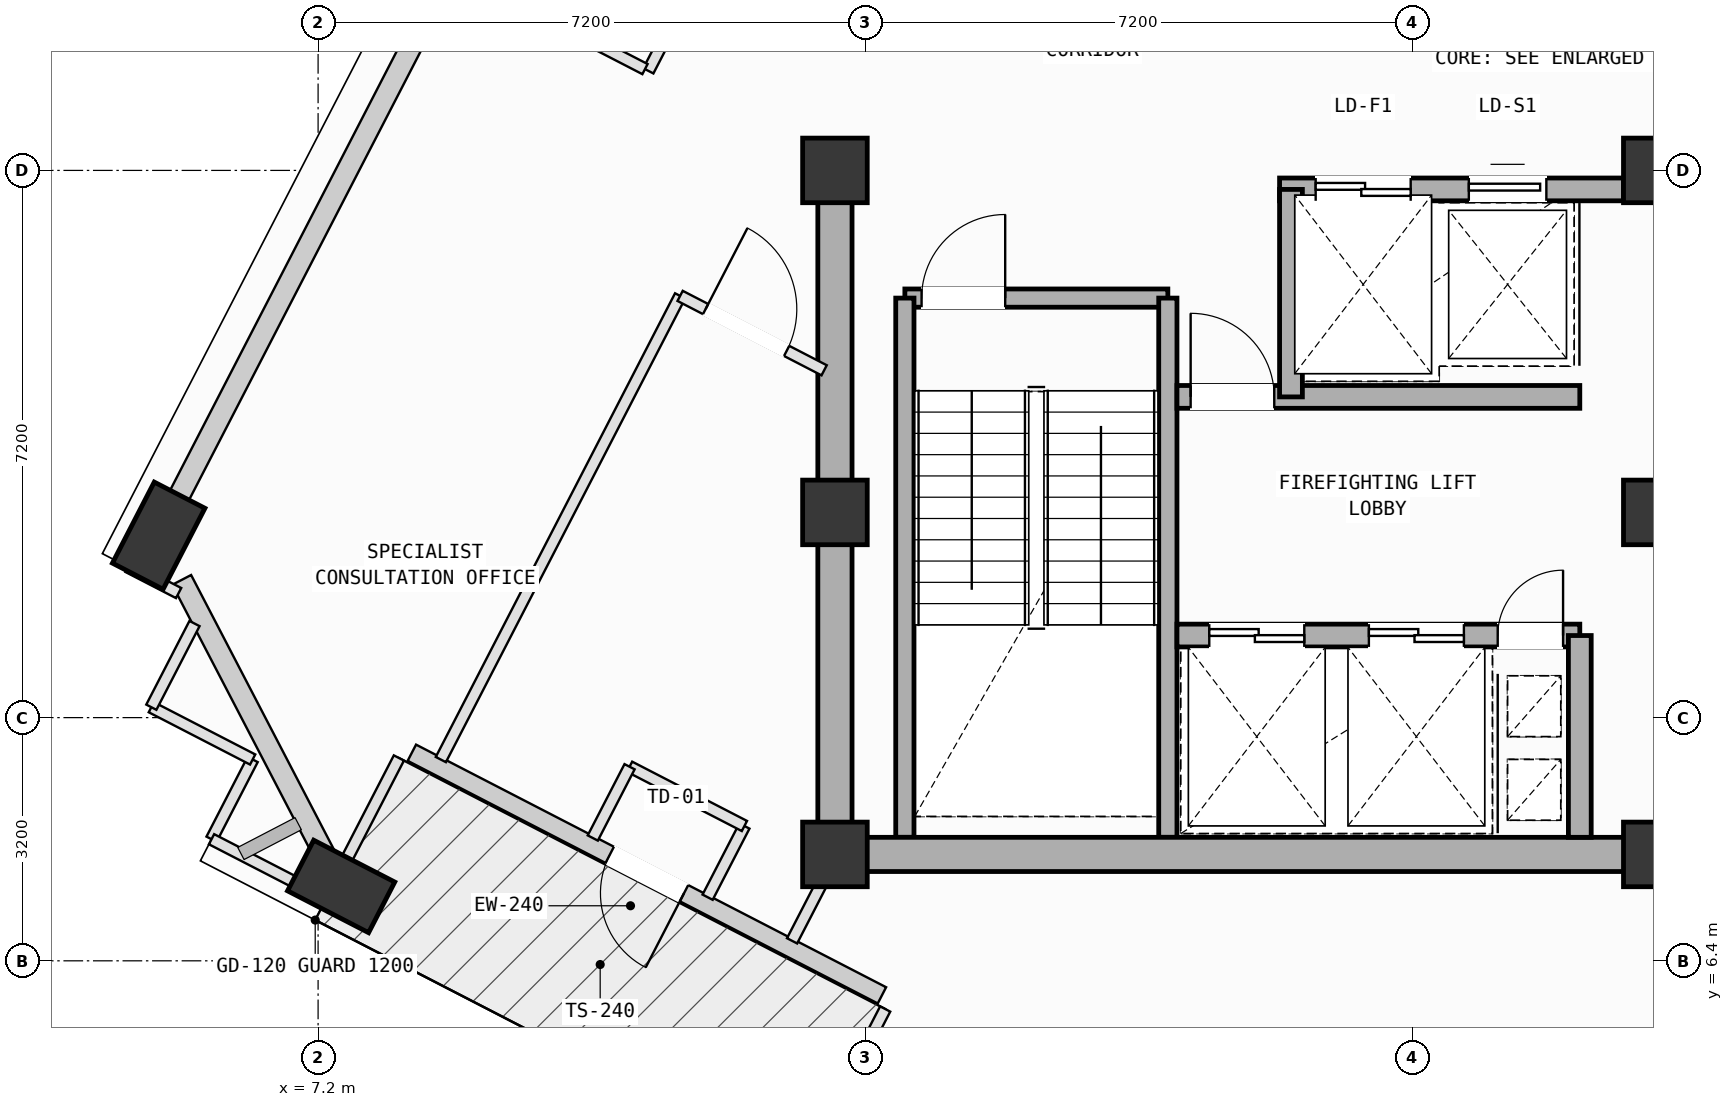
"""IFC4 building model, lengths in metres.
Left out: names, types, materials, properties, quantities, classifications, styles, units other than length and angle.
Written with IfcOpenShell. Run it as: python <this file> out.ifc"""

import sys

from ifc_helpers import new_model, si_unit, direction, frame, frame_2d, origin, origin_2d, place, context, subcontext, project, spatial, rectangle, extrude, element, fill, save


model = new_model("IFC4")
c1 = context("Model", 3, precision=1e-05, world=origin(), true_north=direction((0.0, 1.0)))
c2 = subcontext(c1, "Body", "Model", "MODEL_VIEW")
j1 = project(units=[si_unit("LENGTHUNIT", "METRE"), si_unit("PLANEANGLEUNIT", "RADIAN")], contexts=[c1])
p1 = place(None, origin())
s1 = spatial("IfcSite", under=j1, at=p1, CompositionType="ELEMENT")
p2 = place(p1, origin())
s2 = spatial("IfcBuilding", under=s1, at=p2, CompositionType="ELEMENT")
p3 = place(p2, frame((0.0, 0.0, 292.6)))
s3 = spatial("IfcBuildingStorey", under=s2, at=p3, CompositionType="ELEMENT", Elevation=292.6)
for number, where, z_axis, x_axis in (
    (1, (14.0, 7.8, 0.0), (0.0, 0.0, 1.0), (1.0, 0.0, 0.0)),
    (2, (14.0, 12.3, 0.0), (0.0, 0.0, 1.0), (1.0, 0.0, 0.0)),
    (3, (14.0, 16.8, 0.0), (0.0, 0.0, 1.0), (1.0, 0.0, 0.0)),
    (4, (24.8, 7.8, 0.0), (0.0, 0.0, 1.0), (1.0, 0.0, 0.0)),
    (5, (24.8, 12.3, 0.0), (0.0, 0.0, 1.0), (1.0, 0.0, 0.0)),
    (6, (24.8, 16.8, 0.0), (0.0, 0.0, 1.0), (1.0, 0.0, 0.0)),
):
    element("IfcColumn", number, at=place(p3, frame(where, z_axis=z_axis, x_axis=x_axis)), inside=s3, PredefinedType="COLUMN", context=c2, shape_type="SweptSolid", body=[
        extrude(rectangle(XDim=0.85, YDim=0.85, at=origin_2d()), origin(), (0.0, 0.0, 1.0), 4.0),
    ])
p4 = place(p3, frame((8.863, 19.281, 0.002), z_axis=(0.023634379865, -0.101767573967, 0.994527413889), x_axis=(0.246838352146, 0.964599256067, 0.092839124866)))
e7 = element("IfcColumn", 7, at=p4, inside=s3, PredefinedType="COLUMN", context=c2, shape_type="SweptSolid", body=[
    extrude(rectangle(XDim=1.2, YDim=0.75, at=origin_2d()), origin(), (0.0, 0.0, 1.0), 4.018),
])
p5 = place(p3, frame((5.103, 11.994, 0.002), z_axis=(0.053617586983, -0.116746994481, 0.991713312226), x_axis=(0.049001612561, 0.992253020135, 0.114161228095)))
e8 = element("IfcColumn", 8, at=p5, inside=s3, PredefinedType="COLUMN", context=c2, shape_type="SweptSolid", body=[
    extrude(rectangle(XDim=1.2, YDim=0.75, at=origin_2d()), origin(), (0.0, 0.0, 1.0), 4.03),
])
p6 = place(p3, frame((7.503, 7.379, 0.002), z_axis=(0.072515084343, -0.106682592755, 0.991645292908), x_axis=(-0.990592693613, -0.123392933804, 0.059163326888)))
e9 = element("IfcColumn", 9, at=p6, inside=s3, PredefinedType="COLUMN", context=c2, shape_type="SweptSolid", body=[
    extrude(rectangle(XDim=1.2, YDim=0.75, at=origin_2d()), origin(), (0.0, 0.0, 1.0), 4.03),
])
p7 = place(p3, frame((14.618, 5.946, 0.0), z_axis=(0.0, 0.0, 1.0), x_axis=(-0.888607744186, 0.45866793759, 0.0)))
e10 = element("IfcWall", 10, at=p7, inside=s3, PredefinedType="SOLIDWALL", context=c2, shape_type="SweptSolid", body=[
    extrude(rectangle(XDim=6.96, YDim=0.24, at=frame_2d((3.48, 0.0))), origin(), (0.0, 0.0, 1.0), 3.265),
])
p8 = place(p7, frame((2.93, 0.0, 0.0)))
e11 = element("IfcOpeningElement", 11, at=p8, cuts=e10, PredefinedType="OPENING", context=c2, shape_type="SweptSolid", body=[
    extrude(rectangle(XDim=1.1, YDim=2.15, at=frame_2d((0.55, 1.075))), frame((0.0, 0.13, 0.0), z_axis=(0.0, -1.0, 0.0), x_axis=(1.0, 0.0, 0.0)), (0.0, 0.0, 1.0), 0.26),
])
p9 = place(p3, frame((5.186, 12.156, 0.0), z_axis=(0.0, 0.0, 1.0), x_axis=(0.458658706645, 0.888612508813, 0.0)))
e12 = element("IfcWall", 12, at=p9, inside=s3, PredefinedType="SOLIDWALL", context=c2, shape_type="SweptSolid", body=[
    extrude(rectangle(XDim=7.485, YDim=0.28, at=frame_2d((3.742, 0.0))), origin(), (0.0, 0.0, 1.0), 3.265),
])
p10 = place(p3, frame((7.345, 7.683, 0.0), z_axis=(0.0, 0.0, 1.0), x_axis=(-0.461467947399, 0.887156882137, 0.0)))
e13 = element("IfcWall", 13, at=p10, inside=s3, PredefinedType="SOLIDWALL", context=c2, shape_type="SweptSolid", body=[
    extrude(rectangle(XDim=4.203, YDim=0.28, at=frame_2d((2.102, 0.0))), origin(), (0.0, 0.0, 1.0), 3.265),
])
p11 = place(p3, frame((14.92, 15.12, 0.0), z_axis=(0.0, 0.0, 1.0), x_axis=(1.0, 0.0, 0.0)))
e14 = element("IfcWall", 14, at=p11, inside=s3, PredefinedType="SOLIDWALL", context=c2, shape_type="SweptSolid", body=[
    extrude(rectangle(XDim=3.46, YDim=0.24, at=frame_2d((1.73, 0.0))), origin(), (0.0, 0.0, 1.0), 3.78),
])
p12 = place(p11, frame((0.22, 0.0, 0.0)))
e15 = element("IfcOpeningElement", 15, at=p12, cuts=e14, PredefinedType="OPENING", context=c2, shape_type="SweptSolid", body=[
    extrude(rectangle(XDim=1.1, YDim=2.15, at=frame_2d((0.55, 1.075))), frame((0.0, 0.13, 0.0), z_axis=(0.0, -1.0, 0.0), x_axis=(1.0, 0.0, 0.0)), (0.0, 0.0, 1.0), 0.26),
])
for number, where, z_axis, x_axis in (
    (16, (18.38, 15.12, 0.0), (0.0, 0.0, 1.0), (0.0, -1.0, 0.0)),
    (17, (14.92, 8.025, 0.0), (0.0, 0.0, 1.0), (0.0, 1.0, 0.0)),
):
    element("IfcWall", number, at=place(p3, frame(where, z_axis=z_axis, x_axis=x_axis)), inside=s3, PredefinedType="SOLIDWALL", context=c2, shape_type="SweptSolid", body=[
        extrude(rectangle(XDim=7.095, YDim=0.24, at=frame_2d((3.548, 0.0))), origin(), (0.0, 0.0, 1.0), 3.78),
    ])
p13 = place(p3, frame((14.0, 7.8, 0.0), z_axis=(0.0, 0.0, 1.0), x_axis=(1.0, 0.0, 0.0)))
e18 = element("IfcWall", 18, at=p13, inside=s3, PredefinedType="SHEAR", context=c2, shape_type="SweptSolid", body=[
    extrude(rectangle(XDim=10.8, YDim=0.45, at=frame_2d((5.4, 0.0))), origin(), (0.0, 0.0, 1.0), 3.78),
])
p14 = place(p3, frame((14.0, 16.8, 0.0), z_axis=(0.0, 0.0, 1.0), x_axis=(0.0, -1.0, 0.0)))
e19 = element("IfcWall", 19, at=p14, inside=s3, PredefinedType="SHEAR", context=c2, shape_type="SweptSolid", body=[
    extrude(rectangle(XDim=9.0, YDim=0.45, at=frame_2d((4.5, 0.0))), origin(), (0.0, 0.0, 1.0), 3.78),
])
p15 = place(p3, frame((19.85, 16.55, 0.0), z_axis=(0.0, 0.0, 1.0), x_axis=(1.0, 0.0, 0.0)))
e20 = element("IfcWall", 20, at=p15, inside=s3, PredefinedType="SOLIDWALL", context=c2, shape_type="SweptSolid", body=[
    extrude(rectangle(XDim=4.525, YDim=0.3, at=frame_2d((2.262, 0.0))), origin(), (0.0, 0.0, 1.0), 3.78),
])
p16 = place(p15, frame((0.475, 0.0, 0.0)))
e21 = element("IfcOpeningElement", 21, at=p16, cuts=e20, PredefinedType="OPENING", context=c2, shape_type="SweptSolid", body=[
    extrude(rectangle(XDim=1.25, YDim=2.18, at=frame_2d((0.625, 1.09))), frame((0.0, 0.16, 0.0), z_axis=(0.0, -1.0, 0.0), x_axis=(1.0, 0.0, 0.0)), (0.0, 0.0, 1.0), 0.32),
])
p17 = place(p15, frame((2.49, 0.0, 0.0)))
e22 = element("IfcOpeningElement", 22, at=p17, cuts=e20, PredefinedType="OPENING", context=c2, shape_type="SweptSolid", body=[
    extrude(rectangle(XDim=1.02, YDim=2.12, at=frame_2d((0.51, 1.06))), frame((0.0, 0.16, 0.0), z_axis=(0.0, -1.0, 0.0), x_axis=(1.0, 0.0, 0.0)), (0.0, 0.0, 1.0), 0.32),
])
p18 = place(p3, frame((18.5, 10.68, 0.0), z_axis=(0.0, 0.0, 1.0), x_axis=(1.0, 0.0, 0.0)))
e23 = element("IfcWall", 23, at=p18, inside=s3, PredefinedType="SOLIDWALL", context=c2, shape_type="SweptSolid", body=[
    extrude(rectangle(XDim=5.3, YDim=0.3, at=frame_2d((2.65, 0.0))), origin(), (0.0, 0.0, 1.0), 3.78),
])
p19 = place(p18, frame((4.22, 0.0, 0.0)))
e24 = element("IfcOpeningElement", 24, at=p19, cuts=e23, PredefinedType="OPENING", context=c2, shape_type="SweptSolid", body=[
    extrude(rectangle(XDim=0.86, YDim=2.06, at=frame_2d((0.43, 1.03))), frame((0.0, 0.16, 0.0), z_axis=(0.0, -1.0, 0.0), x_axis=(1.0, 0.0, 0.0)), (0.0, 0.0, 1.0), 0.32),
])
p20 = place(p18, frame((0.425, 0.0, 0.0)))
e25 = element("IfcOpeningElement", 25, at=p20, cuts=e23, PredefinedType="OPENING", context=c2, shape_type="SweptSolid", body=[
    extrude(rectangle(XDim=1.25, YDim=2.18, at=frame_2d((0.625, 1.09))), frame((0.0, 0.16, 0.0), z_axis=(0.0, -1.0, 0.0), x_axis=(1.0, 0.0, 0.0)), (0.0, 0.0, 1.0), 0.32),
])
p21 = place(p18, frame((2.525, 0.0, 0.0)))
e26 = element("IfcOpeningElement", 26, at=p21, cuts=e23, PredefinedType="OPENING", context=c2, shape_type="SweptSolid", body=[
    extrude(rectangle(XDim=1.25, YDim=2.18, at=frame_2d((0.625, 1.09))), frame((0.0, 0.16, 0.0), z_axis=(0.0, -1.0, 0.0), x_axis=(1.0, 0.0, 0.0)), (0.0, 0.0, 1.0), 0.32),
])
p22 = place(p3, frame((18.5, 13.82, 0.0), z_axis=(0.0, 0.0, 1.0), x_axis=(1.0, 0.0, 0.0)))
e27 = element("IfcWall", 27, at=p22, inside=s3, PredefinedType="SOLIDWALL", context=c2, shape_type="SweptSolid", body=[
    extrude(rectangle(XDim=5.3, YDim=0.3, at=frame_2d((2.65, 0.0))), origin(), (0.0, 0.0, 1.0), 3.78),
])
p23 = place(p22, frame((0.18, 0.0, 0.0)))
e28 = element("IfcOpeningElement", 28, at=p23, cuts=e27, PredefinedType="OPENING", context=c2, shape_type="SweptSolid", body=[
    extrude(rectangle(XDim=1.1, YDim=2.15, at=frame_2d((0.55, 1.075))), frame((0.0, 0.16, 0.0), z_axis=(0.0, -1.0, 0.0), x_axis=(1.0, 0.0, 0.0)), (0.0, 0.0, 1.0), 0.32),
])
p24 = place(p3, frame((23.8, 8.025, 0.0), z_axis=(0.0, 0.0, 1.0), x_axis=(0.0, 1.0, 0.0)))
e29 = element("IfcWall", 29, at=p24, inside=s3, PredefinedType="SOLIDWALL", context=c2, shape_type="SweptSolid", body=[
    extrude(rectangle(XDim=2.655, YDim=0.3, at=frame_2d((1.328, 0.0))), origin(), (0.0, 0.0, 1.0), 3.78),
])
p25 = place(p3, frame((20.0, 13.82, 0.0), z_axis=(0.0, 0.0, 1.0), x_axis=(0.0, 1.0, 0.0)))
e30 = element("IfcWall", 30, at=p25, inside=s3, PredefinedType="SOLIDWALL", context=c2, shape_type="SweptSolid", body=[
    extrude(rectangle(XDim=2.73, YDim=0.3, at=frame_2d((1.365, 0.0))), origin(), (0.0, 0.0, 1.0), 3.78),
])
p26 = place(p3, frame((13.707, 3.918, 0.0), z_axis=(0.0, 0.0, 1.0), x_axis=(0.458633949278, 0.888625286929, 0.0)))
e31 = element("IfcWall", 31, at=p26, inside=s3, PredefinedType="PARTITIONING", context=c2, shape_type="SweptSolid", body=[
    extrude(rectangle(XDim=2.08, YDim=0.15, at=frame_2d((1.04, 0.0))), origin(), (0.0, 0.0, 1.0), 3.78),
])
p27 = place(p3, frame((13.436, 6.663, 0.0), z_axis=(0.0, 0.0, 1.0), x_axis=(0.458583488953, 0.888651328508, 0.0)))
e32 = element("IfcWall", 32, at=p27, inside=s3, PredefinedType="PARTITIONING", context=c2, shape_type="SweptSolid", body=[
    extrude(rectangle(XDim=0.942, YDim=0.15, at=frame_2d((0.471, 0.0))), origin(), (0.0, 0.0, 1.0), 3.78),
])
p28 = place(p3, frame((12.325, 7.237, 0.0), z_axis=(0.0, 0.0, 1.0), x_axis=(0.459026142126, 0.888422760202, 0.0)))
e33 = element("IfcWall", 33, at=p28, inside=s3, PredefinedType="PARTITIONING", context=c2, shape_type="SweptSolid", body=[
    extrude(rectangle(XDim=1.055, YDim=0.15, at=frame_2d((0.527, 0.0))), origin(), (0.0, 0.0, 1.0), 3.78),
])
p29 = place(p3, frame((12.809, 8.174, 0.0), z_axis=(0.0, 0.0, 1.0), x_axis=(-0.888581014503, 0.458719719072, 0.0)))
e34 = element("IfcWall", 34, at=p29, inside=s3, PredefinedType="PARTITIONING", context=c2, shape_type="SweptSolid", body=[
    extrude(rectangle(XDim=1.7, YDim=0.15, at=frame_2d((0.85, 0.0))), origin(), (0.0, 0.0, 1.0), 3.78),
])
p30 = place(p3, frame((11.298, 8.954, 0.0), z_axis=(0.0, 0.0, 1.0), x_axis=(-0.458648811298, -0.888617616242, 0.0)))
e35 = element("IfcWall", 35, at=p30, inside=s3, PredefinedType="PARTITIONING", context=c2, shape_type="SweptSolid", body=[
    extrude(rectangle(XDim=1.056, YDim=0.15, at=frame_2d((0.528, 0.0))), origin(), (0.0, 0.0, 1.0), 3.78),
])
p31 = place(p3, frame((8.815, 9.048, 0.0), z_axis=(0.0, 0.0, 1.0), x_axis=(0.458543271669, 0.888672081258, 0.0)))
e36 = element("IfcWall", 36, at=p31, inside=s3, PredefinedType="PARTITIONING", context=c2, shape_type="SweptSolid", body=[
    extrude(rectangle(XDim=6.865, YDim=0.15, at=frame_2d((3.433, 0.0))), origin(), (0.0, 0.0, 1.0), 3.78),
])
p32 = place(p3, frame((11.963, 15.149, 0.0), z_axis=(0.0, 0.0, 1.0), x_axis=(0.888443021372, -0.458986925496, 0.0)))
e37 = element("IfcWall", 37, at=p32, inside=s3, PredefinedType="PARTITIONING", context=c2, shape_type="SweptSolid", body=[
    extrude(rectangle(XDim=2.133, YDim=0.15, at=frame_2d((1.066, 0.0))), origin(), (0.0, 0.0, 1.0), 3.78),
])
p33 = place(p32, frame((0.377, 0.0, 0.0)))
e38 = element("IfcOpeningElement", 38, at=p33, cuts=e37, PredefinedType="OPENING", context=c2, shape_type="SweptSolid", body=[
    extrude(rectangle(XDim=1.2, YDim=2.15, at=frame_2d((0.6, 1.075))), frame((0.0, 0.085, 0.0), z_axis=(0.0, -1.0, 0.0), x_axis=(1.0, 0.0, 0.0)), (0.0, 0.0, 1.0), 0.17),
])
p34 = place(p3, frame((5.798, 8.0, 0.0), z_axis=(0.0, 0.0, 1.0), x_axis=(0.458347851985, 0.888772888077, 0.0)))
e39 = element("IfcWall", 39, at=p34, inside=s3, PredefinedType="PARTITIONING", context=c2, shape_type="SweptSolid", body=[
    extrude(rectangle(XDim=1.18, YDim=0.15, at=frame_2d((0.59, 0.0))), origin(), (0.0, 0.0, 1.0), 3.78),
])
p35 = place(p3, frame((6.339, 9.049, 0.0), z_axis=(0.0, 0.0, 1.0), x_axis=(-0.88862493644, 0.458634628368, 0.0)))
e40 = element("IfcWall", 40, at=p35, inside=s3, PredefinedType="PARTITIONING", context=c2, shape_type="SweptSolid", body=[
    extrude(rectangle(XDim=1.5, YDim=0.15, at=frame_2d((0.75, 0.0))), origin(), (0.0, 0.0, 1.0), 3.78),
])
p36 = place(p3, frame((5.006, 9.737, 0.0), z_axis=(0.0, 0.0, 1.0), x_axis=(0.458452126499, 0.888719105066, 0.0)))
e41 = element("IfcWall", 41, at=p36, inside=s3, PredefinedType="PARTITIONING", context=c2, shape_type="SweptSolid", body=[
    extrude(rectangle(XDim=1.239, YDim=0.15, at=frame_2d((0.619, 0.0))), origin(), (0.0, 0.0, 1.0), 3.78),
])
p37 = place(p3, frame((5.365, 11.239, 0.0), z_axis=(0.0, 0.0, 1.0), x_axis=(-0.888487880931, 0.458900082196, 0.0)))
e42 = element("IfcWall", 42, at=p37, inside=s3, PredefinedType="PARTITIONING", context=c2, shape_type="SweptSolid", body=[
    extrude(rectangle(XDim=0.75, YDim=0.15, at=frame_2d((0.375, 0.0))), origin(), (0.0, 0.0, 1.0), 3.78),
])
p38 = place(p3, frame((4.699, 11.583, 0.0), z_axis=(0.0, 0.0, 1.0), x_axis=(0.459186862893, 0.888339701323, 0.0)))
e43 = element("IfcWall", 43, at=p38, inside=s3, PredefinedType="PARTITIONING", context=c2, shape_type="SweptSolid", body=[
    extrude(rectangle(XDim=0.732, YDim=0.15, at=frame_2d((0.366, 0.0))), origin(), (0.0, 0.0, 1.0), 3.78),
])
p39 = place(p3, frame((8.263, 9.069, 0.0), z_axis=(0.0, 0.0, 1.0), x_axis=(-0.458442651209, -0.888723992898, 0.0)))
e44 = element("IfcWall", 44, at=p39, inside=s3, PredefinedType="PARTITIONING", context=c2, shape_type="SweptSolid", body=[
    extrude(rectangle(XDim=2.081, YDim=0.15, at=frame_2d((1.04, 0.0))), origin(), (0.0, 0.0, 1.0), 3.78),
])
p40 = place(p3, frame((7.309, 7.22, 0.0), z_axis=(0.0, 0.0, 1.0), x_axis=(-0.888581014503, 0.458719719072, 0.0)))
e45 = element("IfcWall", 45, at=p40, inside=s3, PredefinedType="PARTITIONING", context=c2, shape_type="SweptSolid", body=[
    extrude(rectangle(XDim=1.7, YDim=0.15, at=frame_2d((0.85, 0.0))), origin(), (0.0, 0.0, 1.0), 3.78),
])
p41 = place(p3, frame((12.326, 19.623, 0.0), z_axis=(0.0, 0.0, 1.0), x_axis=(-0.45870501117, -0.888588607134, 0.0)))
e46 = element("IfcWall", 46, at=p41, inside=s3, PredefinedType="PARTITIONING", context=c2, shape_type="SweptSolid", body=[
    extrude(rectangle(XDim=1.703, YDim=0.15, at=frame_2d((0.851, 0.0))), origin(), (0.0, 0.0, 1.0), 3.415),
])
p42 = place(p3, frame((11.501, 18.133, 0.0), z_axis=(0.0, 0.0, 1.0), x_axis=(-0.888561279263, 0.458757945975, 0.0)))
e47 = element("IfcWall", 47, at=p42, inside=s3, PredefinedType="PARTITIONING", context=c2, shape_type="SweptSolid", body=[
    extrude(rectangle(XDim=2.757, YDim=0.15, at=frame_2d((1.379, 0.0))), origin(), (0.0, 0.0, 1.0), 3.78),
])
p43 = place(p8, origin())
e48 = element("IfcDoor", 48, at=p43, inside=s3, OperationType="SINGLE_SWING_LEFT", PredefinedType="DOOR", context=c2, shape_type="SweptSolid", body=[
    extrude(rectangle(XDim=1.1, YDim=2.15, at=frame_2d((0.55, 1.075))), frame((0.0, 0.025, 0.0), z_axis=(0.0, -1.0, 0.0), x_axis=(1.0, 0.0, 0.0)), (0.0, 0.0, 1.0), 0.05),
])
fill(e11, e48)
p44 = place(p12, origin())
e49 = element("IfcDoor", 49, at=p44, inside=s3, OperationType="SINGLE_SWING_RIGHT", PredefinedType="DOOR", context=c2, shape_type="SweptSolid", body=[
    extrude(rectangle(XDim=1.1, YDim=2.15, at=frame_2d((0.55, 1.075))), frame((0.0, 0.025, 0.0), z_axis=(0.0, -1.0, 0.0), x_axis=(1.0, 0.0, 0.0)), (0.0, 0.0, 1.0), 0.05),
])
fill(e15, e49)
p45 = place(p19, origin())
e50 = element("IfcDoor", 50, at=p45, inside=s3, OperationType="SINGLE_SWING_RIGHT", PredefinedType="DOOR", context=c2, shape_type="SweptSolid", body=[
    extrude(rectangle(XDim=0.86, YDim=2.06, at=frame_2d((0.43, 1.03))), frame((0.0, 0.025, 0.0), z_axis=(0.0, -1.0, 0.0), x_axis=(1.0, 0.0, 0.0)), (0.0, 0.0, 1.0), 0.05),
])
fill(e24, e50)
p46 = place(p23, origin())
e51 = element("IfcDoor", 51, at=p46, inside=s3, OperationType="SINGLE_SWING_LEFT", PredefinedType="DOOR", context=c2, shape_type="SweptSolid", body=[
    extrude(rectangle(XDim=1.1, YDim=2.15, at=frame_2d((0.55, 1.075))), frame((0.0, 0.025, 0.0), z_axis=(0.0, -1.0, 0.0), x_axis=(1.0, 0.0, 0.0)), (0.0, 0.0, 1.0), 0.05),
])
fill(e28, e51)
p47 = place(p20, origin())
e52 = element("IfcDoor", 52, at=p47, inside=s3, OperationType="DOUBLE_DOOR_SLIDING", PredefinedType="DOOR", context=c2, shape_type="SweptSolid", body=[
    extrude(rectangle(XDim=1.25, YDim=2.18, at=frame_2d((0.625, 1.09))), frame((0.0, 0.025, 0.0), z_axis=(0.0, -1.0, 0.0), x_axis=(1.0, 0.0, 0.0)), (0.0, 0.0, 1.0), 0.05),
])
fill(e25, e52)
p48 = place(p21, origin())
e53 = element("IfcDoor", 53, at=p48, inside=s3, OperationType="DOUBLE_DOOR_SLIDING", PredefinedType="DOOR", context=c2, shape_type="SweptSolid", body=[
    extrude(rectangle(XDim=1.25, YDim=2.18, at=frame_2d((0.625, 1.09))), frame((0.0, 0.025, 0.0), z_axis=(0.0, -1.0, 0.0), x_axis=(1.0, 0.0, 0.0)), (0.0, 0.0, 1.0), 0.05),
])
fill(e26, e53)
p49 = place(p16, origin())
e54 = element("IfcDoor", 54, at=p49, inside=s3, OperationType="DOUBLE_DOOR_SLIDING", PredefinedType="DOOR", context=c2, shape_type="SweptSolid", body=[
    extrude(rectangle(XDim=1.25, YDim=2.18, at=frame_2d((0.625, 1.09))), frame((0.0, 0.025, 0.0), z_axis=(0.0, -1.0, 0.0), x_axis=(1.0, 0.0, 0.0)), (0.0, 0.0, 1.0), 0.05),
])
fill(e21, e54)
p50 = place(p17, origin())
e55 = element("IfcDoor", 55, at=p50, inside=s3, OperationType="SLIDING_TO_LEFT", PredefinedType="DOOR", context=c2, shape_type="SweptSolid", body=[
    extrude(rectangle(XDim=1.02, YDim=2.12, at=frame_2d((0.51, 1.06))), frame((0.0, 0.025, 0.0), z_axis=(0.0, -1.0, 0.0), x_axis=(1.0, 0.0, 0.0)), (0.0, 0.0, 1.0), 0.05),
])
fill(e22, e55)
p51 = place(p33, origin())
e56 = element("IfcDoor", 56, at=p51, inside=s3, OperationType="SINGLE_SWING_LEFT", PredefinedType="DOOR", context=c2, shape_type="SweptSolid", body=[
    extrude(rectangle(XDim=1.2, YDim=2.15, at=frame_2d((0.6, 1.075))), frame((0.0, 0.025, 0.0), z_axis=(0.0, -1.0, 0.0), x_axis=(1.0, 0.0, 0.0)), (0.0, 0.0, 1.0), 0.05),
])
fill(e38, e56)
save(model, sys.argv[1])
